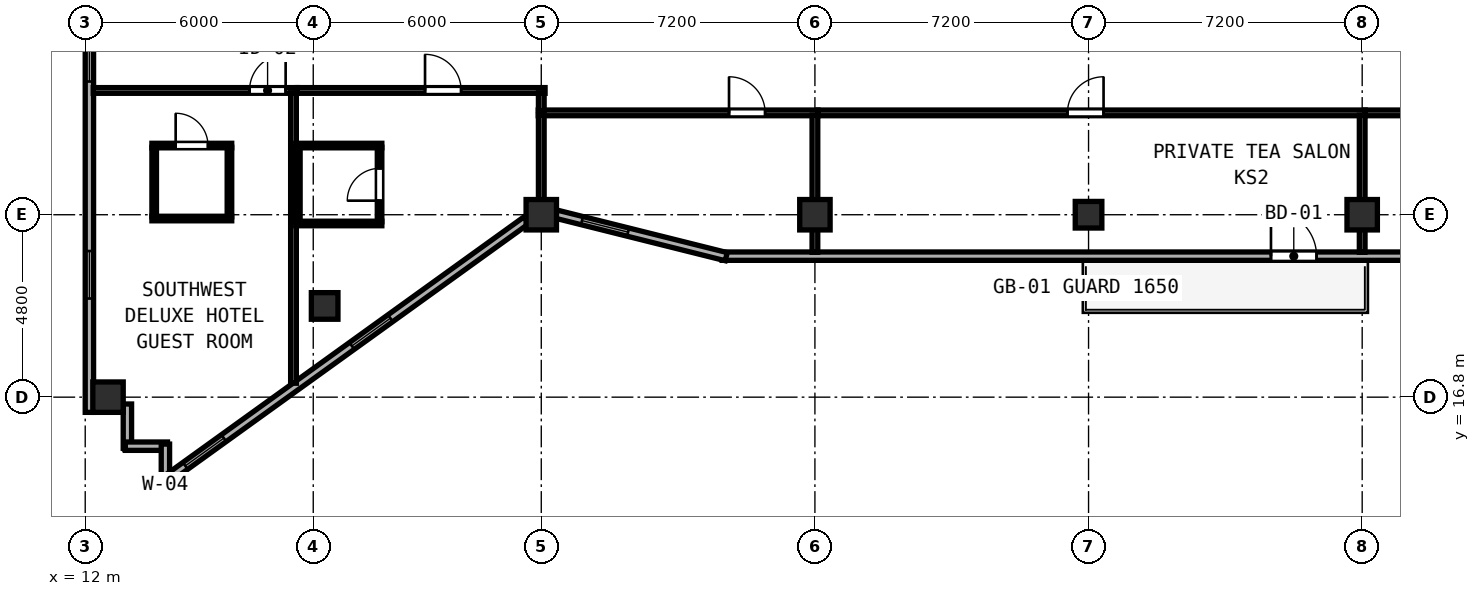
"""IFC4 building model, lengths in metres.
Left out: names, types, materials, properties, quantities, classifications, styles, units other than length and angle.
Written with IfcOpenShell. Run it as: python <this file> out.ifc"""

import sys

from ifc_helpers import new_model, si_unit, direction, frame, frame_2d, origin, origin_2d, place, context, subcontext, project, spatial, rectangle, hollow_rectangle, extrude, element, fill, save


model = new_model("IFC4")
c1 = context("Model", 3, precision=1e-05, world=origin(), true_north=direction((0.0, 1.0)))
c2 = subcontext(c1, "Body", "Model", "MODEL_VIEW")
j1 = project(units=[si_unit("LENGTHUNIT", "METRE"), si_unit("PLANEANGLEUNIT", "RADIAN")], contexts=[c1])
p1 = place(None, origin())
s1 = spatial("IfcSite", under=j1, at=p1, CompositionType="ELEMENT")
p2 = place(p1, origin())
s2 = spatial("IfcBuilding", under=s1, at=p2, CompositionType="ELEMENT")
p3 = place(p2, frame((0.0, 0.0, 246.75)))
s3 = spatial("IfcBuildingStorey", under=s2, at=p3, CompositionType="ELEMENT", Elevation=246.75)
for number, where, z_axis, x_axis in (
    (1, (24.0, 21.6, 0.0), (0.0, 0.0, 1.0), (1.0, 0.0, 0.0)),
    (2, (31.2, 21.6, 0.0), (0.0, 0.0, 1.0), (1.0, 0.0, 0.0)),
    (3, (45.6, 21.6, 0.0), (0.0, 0.0, 1.0), (1.0, 0.0, 0.0)),
    (4, (12.6, 16.8, 0.0), (0.0, 0.0, 1.0), (1.0, 0.0, 0.0)),
):
    element("IfcColumn", number, at=place(p3, frame(where, z_axis=z_axis, x_axis=x_axis)), inside=s3, PredefinedType="COLUMN", context=c2, shape_type="SweptSolid", body=[
        extrude(hollow_rectangle(XDim=0.8, YDim=0.8, WallThickness=0.03, at=origin_2d()), origin(), (0.0, 0.0, 1.0), 3.85),
    ])
for number, where, z_axis, x_axis in (
    (5, (38.4, 21.6, 0.0), (0.0, 0.0, 1.0), (1.0, 0.0, 0.0)),
    (6, (18.3, 19.2, 0.0), (0.0, 0.0, 1.0), (1.0, 0.0, 0.0)),
):
    element("IfcColumn", number, at=place(p3, frame(where, z_axis=z_axis, x_axis=x_axis)), inside=s3, PredefinedType="COLUMN", context=c2, shape_type="SweptSolid", body=[
        extrude(hollow_rectangle(XDim=0.7, YDim=0.7, WallThickness=0.026, at=origin_2d()), origin(), (0.0, 0.0, 1.0), 3.85),
    ])
p4 = place(p3, frame((28.759, 20.51, 0.0), z_axis=(0.0, 0.0, 1.0), x_axis=(1.0, 0.0, 0.0)))
e7 = element("IfcWall", 7, at=p4, inside=s3, PredefinedType="SOLIDWALL", context=c2, shape_type="SweptSolid", body=[
    extrude(rectangle(XDim=19.283, YDim=0.22, at=frame_2d((9.642, 0.0))), origin(), (0.0, 0.0, 1.0), 3.67),
])
p5 = place(p4, frame((15.641, 0.0, 0.0), z_axis=(0.0, 0.0, 1.0), x_axis=(-1.0, 0.0, 0.0)))
e8 = element("IfcOpeningElement", 8, at=p5, cuts=e7, PredefinedType="OPENING", context=c2, shape_type="SweptSolid", body=[
    extrude(rectangle(XDim=1.2, YDim=2.15, at=frame_2d((0.6, 1.075))), frame((0.0, 0.12, 0.0), z_axis=(0.0, -1.0, 0.0), x_axis=(1.0, 0.0, 0.0)), (0.0, 0.0, 1.0), 0.24),
])
p6 = place(p3, frame((12.11, 37.545, 0.0), z_axis=(0.0, 0.0, 1.0), x_axis=(0.0, -1.0, 0.0)))
e9 = element("IfcWall", 9, at=p6, inside=s3, PredefinedType="SOLIDWALL", context=c2, shape_type="SweptSolid", body=[
    extrude(rectangle(XDim=21.145, YDim=0.22, at=frame_2d((10.573, 0.0))), origin(), (0.0, 0.0, 1.0), 3.67),
])
p7 = place(p6, frame((0.7, 0.0, 0.85)))
e10 = element("IfcOpeningElement", 10, at=p7, cuts=e9, PredefinedType="OPENING", context=c2, shape_type="SweptSolid", body=[
    extrude(rectangle(XDim=1.25, YDim=1.95, at=frame_2d((0.625, 0.975))), frame((0.0, 0.12, 0.0), z_axis=(0.0, -1.0, 0.0), x_axis=(1.0, 0.0, 0.0)), (0.0, 0.0, 1.0), 0.24),
])
p8 = place(p6, frame((6.1, 0.0, 0.85)))
e11 = element("IfcOpeningElement", 11, at=p8, cuts=e9, PredefinedType="OPENING", context=c2, shape_type="SweptSolid", body=[
    extrude(rectangle(XDim=1.25, YDim=1.95, at=frame_2d((0.625, 0.975))), frame((0.0, 0.12, 0.0), z_axis=(0.0, -1.0, 0.0), x_axis=(1.0, 0.0, 0.0)), (0.0, 0.0, 1.0), 0.24),
])
p9 = place(p6, frame((11.19, 0.0, 0.85)))
e12 = element("IfcOpeningElement", 12, at=p9, cuts=e9, PredefinedType="OPENING", context=c2, shape_type="SweptSolid", body=[
    extrude(rectangle(XDim=1.25, YDim=1.95, at=frame_2d((0.625, 0.975))), frame((0.0, 0.12, 0.0), z_axis=(0.0, -1.0, 0.0), x_axis=(1.0, 0.0, 0.0)), (0.0, 0.0, 1.0), 0.24),
])
p10 = place(p6, frame((16.9, 0.0, 0.85)))
e13 = element("IfcOpeningElement", 13, at=p10, cuts=e9, PredefinedType="OPENING", context=c2, shape_type="SweptSolid", body=[
    extrude(rectangle(XDim=1.25, YDim=1.95, at=frame_2d((0.625, 0.975))), frame((0.0, 0.12, 0.0), z_axis=(0.0, -1.0, 0.0), x_axis=(1.0, 0.0, 0.0)), (0.0, 0.0, 1.0), 0.24),
])
p11 = place(p3, frame((13.11, 16.62, 0.0), z_axis=(0.0, 0.0, 1.0), x_axis=(0.0, -1.0, 0.0)))
e14 = element("IfcWall", 14, at=p11, inside=s3, PredefinedType="SOLIDWALL", context=c2, shape_type="SweptSolid", body=[
    extrude(rectangle(XDim=1.165, YDim=0.22, at=frame_2d((0.583, 0.0))), origin(), (0.0, 0.0, 1.0), 3.67),
])
p12 = place(p3, frame((13.055, 15.51, 0.0), z_axis=(0.0, 0.0, 1.0), x_axis=(1.0, 0.0, 0.0)))
e15 = element("IfcWall", 15, at=p12, inside=s3, PredefinedType="SOLIDWALL", context=c2, shape_type="SweptSolid", body=[
    extrude(rectangle(XDim=1.11, YDim=0.22, at=frame_2d((0.555, 0.0))), origin(), (0.0, 0.0, 1.0), 3.67),
])
p13 = place(p3, frame((14.11, 15.565, 0.0), z_axis=(0.0, 0.0, 1.0), x_axis=(0.0, -1.0, 0.0)))
e16 = element("IfcWall", 16, at=p13, inside=s3, PredefinedType="SOLIDWALL", context=c2, shape_type="SweptSolid", body=[
    extrude(rectangle(XDim=1.005, YDim=0.22, at=frame_2d((0.502, 0.0))), origin(), (0.0, 0.0, 1.0), 3.67),
])
p14 = place(p3, frame((14.065, 14.583, 0.0), z_axis=(0.0, 0.0, 1.0), x_axis=(0.811523708458, 0.584319493608, 0.0)))
e17 = element("IfcWall", 17, at=p14, inside=s3, PredefinedType="SOLIDWALL", context=c2, shape_type="SweptSolid", body=[
    extrude(rectangle(XDim=11.759, YDim=0.22, at=frame_2d((5.879, 0.0))), origin(), (0.0, 0.0, 1.0), 3.315),
])
p15 = place(p14, frame((0.7, 0.0, 0.85)))
e18 = element("IfcOpeningElement", 18, at=p15, cuts=e17, PredefinedType="OPENING", context=c2, shape_type="SweptSolid", body=[
    extrude(rectangle(XDim=1.25, YDim=1.95, at=frame_2d((0.625, 0.975))), frame((0.0, 0.12, 0.0), z_axis=(0.0, -1.0, 0.0), x_axis=(1.0, 0.0, 0.0)), (0.0, 0.0, 1.0), 0.24),
])
p16 = place(p14, frame((6.1, 0.0, 0.85)))
e19 = element("IfcOpeningElement", 19, at=p16, cuts=e17, PredefinedType="OPENING", context=c2, shape_type="SweptSolid", body=[
    extrude(rectangle(XDim=1.25, YDim=1.95, at=frame_2d((0.625, 0.975))), frame((0.0, 0.12, 0.0), z_axis=(0.0, -1.0, 0.0), x_axis=(1.0, 0.0, 0.0)), (0.0, 0.0, 1.0), 0.24),
])
p17 = place(p3, frame((24.392, 21.615, 0.0), z_axis=(0.0, 0.0, 1.0), x_axis=(0.970133159038, -0.242572986408, 0.0)))
e20 = element("IfcWall", 20, at=p17, inside=s3, PredefinedType="SOLIDWALL", context=c2, shape_type="SweptSolid", body=[
    extrude(rectangle(XDim=4.613, YDim=0.22, at=frame_2d((2.306, 0.0))), origin(), (0.0, 0.0, 1.0), 3.315),
])
p18 = place(p17, frame((0.7, 0.0, 0.85)))
e21 = element("IfcOpeningElement", 21, at=p18, cuts=e20, PredefinedType="OPENING", context=c2, shape_type="SweptSolid", body=[
    extrude(rectangle(XDim=1.25, YDim=1.95, at=frame_2d((0.625, 0.975))), frame((0.0, 0.12, 0.0), z_axis=(0.0, -1.0, 0.0), x_axis=(1.0, 0.0, 0.0)), (0.0, 0.0, 1.0), 0.24),
])
p19 = place(p3, frame((23.92, 24.28, 0.0), z_axis=(0.0, 0.0, 1.0), x_axis=(1.0, 0.0, 0.0)))
e22 = element("IfcWall", 22, at=p19, inside=s3, PredefinedType="PARTITIONING", context=c2, shape_type="SweptSolid", body=[
    extrude(rectangle(XDim=7.36, YDim=0.15, at=frame_2d((3.68, 0.0))), origin(), (0.0, 0.0, 1.0), 3.67),
])
p20 = place(p19, frame((5.97, 0.0, 0.0), z_axis=(0.0, 0.0, 1.0), x_axis=(-1.0, 0.0, 0.0)))
e23 = element("IfcOpeningElement", 23, at=p20, cuts=e22, PredefinedType="OPENING", context=c2, shape_type="SweptSolid", body=[
    extrude(rectangle(XDim=0.95, YDim=2.12, at=frame_2d((0.475, 1.06))), frame((0.0, 0.085, 0.0), z_axis=(0.0, -1.0, 0.0), x_axis=(1.0, 0.0, 0.0)), (0.0, 0.0, 1.0), 0.17),
])
p21 = place(p3, frame((24.0, 21.819, 0.0), z_axis=(0.0, 0.0, 1.0), x_axis=(0.0, 1.0, 0.0)))
e24 = element("IfcWall", 24, at=p21, inside=s3, PredefinedType="PARTITIONING", context=c2, shape_type="SweptSolid", body=[
    extrude(rectangle(XDim=2.401, YDim=0.15, at=frame_2d((1.201, 0.0))), origin(), (0.0, 0.0, 1.0), 3.315),
])
p22 = place(p3, frame((31.2, 20.612, 0.0), z_axis=(0.0, 0.0, 1.0), x_axis=(0.0, 1.0, 0.0)))
e25 = element("IfcWall", 25, at=p22, inside=s3, PredefinedType="PARTITIONING", context=c2, shape_type="SweptSolid", body=[
    extrude(rectangle(XDim=3.608, YDim=0.15, at=frame_2d((1.804, 0.0))), origin(), (0.0, 0.0, 1.0), 3.155),
])
p23 = place(p3, frame((31.282, 24.28, 0.0), z_axis=(0.0, 0.0, 1.0), x_axis=(1.0, 0.0, 0.0)))
e26 = element("IfcWall", 26, at=p23, inside=s3, PredefinedType="PARTITIONING", context=c2, shape_type="SweptSolid", body=[
    extrude(rectangle(XDim=14.398, YDim=0.15, at=frame_2d((7.199, 0.0))), origin(), (0.0, 0.0, 1.0), 3.67),
])
p24 = place(p23, frame((7.513, 0.0, 0.0), z_axis=(0.0, 0.0, 1.0), x_axis=(-1.0, 0.0, 0.0)))
e27 = element("IfcOpeningElement", 27, at=p24, cuts=e26, PredefinedType="OPENING", context=c2, shape_type="SweptSolid", body=[
    extrude(rectangle(XDim=0.95, YDim=2.12, at=frame_2d((0.475, 1.06))), frame((0.0, 0.085, 0.0), z_axis=(0.0, -1.0, 0.0), x_axis=(1.0, 0.0, 0.0)), (0.0, 0.0, 1.0), 0.17),
])
p25 = place(p3, frame((45.6, 20.612, 0.0), z_axis=(0.0, 0.0, 1.0), x_axis=(0.0, 1.0, 0.0)))
e28 = element("IfcWall", 28, at=p25, inside=s3, PredefinedType="PARTITIONING", context=c2, shape_type="SweptSolid", body=[
    extrude(rectangle(XDim=3.608, YDim=0.15, at=frame_2d((1.804, 0.0))), origin(), (0.0, 0.0, 1.0), 3.155),
])
p26 = place(p3, frame((45.682, 24.28, 0.0), z_axis=(0.0, 0.0, 1.0), x_axis=(1.0, 0.0, 0.0)))
e29 = element("IfcWall", 29, at=p26, inside=s3, PredefinedType="PARTITIONING", context=c2, shape_type="SweptSolid", body=[
    extrude(rectangle(XDim=6.906, YDim=0.15, at=frame_2d((3.453, 0.0))), origin(), (0.0, 0.0, 1.0), 3.67),
])
p27 = place(p26, frame((2.018, 0.0, 0.0), z_axis=(0.0, 0.0, 1.0), x_axis=(-1.0, 0.0, 0.0)))
e30 = element("IfcOpeningElement", 30, at=p27, cuts=e29, PredefinedType="OPENING", context=c2, shape_type="SweptSolid", body=[
    extrude(rectangle(XDim=0.95, YDim=2.12, at=frame_2d((0.475, 1.06))), frame((0.0, 0.085, 0.0), z_axis=(0.0, -1.0, 0.0), x_axis=(1.0, 0.0, 0.0)), (0.0, 0.0, 1.0), 0.17),
])
p28 = place(p3, frame((12.212, 24.87, 0.0), z_axis=(0.0, 0.0, 1.0), x_axis=(1.0, 0.0, 0.0)))
e31 = element("IfcWall", 31, at=p28, inside=s3, PredefinedType="PARTITIONING", context=c2, shape_type="SweptSolid", body=[
    extrude(rectangle(XDim=5.368, YDim=0.15, at=frame_2d((2.684, 0.0))), origin(), (0.0, 0.0, 1.0), 3.355),
])
p29 = place(p28, frame((5.062, 0.0, 0.0), z_axis=(0.0, 0.0, 1.0), x_axis=(-1.0, 0.0, 0.0)))
e32 = element("IfcOpeningElement", 32, at=p29, cuts=e31, PredefinedType="OPENING", context=c2, shape_type="SweptSolid", body=[
    extrude(rectangle(XDim=0.95, YDim=2.15, at=frame_2d((0.475, 1.075))), frame((0.0, 0.085, 0.0), z_axis=(0.0, -1.0, 0.0), x_axis=(1.0, 0.0, 0.0)), (0.0, 0.0, 1.0), 0.17),
])
p30 = place(p3, frame((17.48, 17.167, 0.0), z_axis=(0.0, 0.0, 1.0), x_axis=(0.0, 1.0, 0.0)))
e33 = element("IfcWall", 33, at=p30, inside=s3, PredefinedType="PARTITIONING", context=c2, shape_type="SweptSolid", body=[
    extrude(rectangle(XDim=7.643, YDim=0.15, at=frame_2d((3.822, 0.0))), origin(), (0.0, 0.0, 1.0), 3.67),
])
p31 = place(p3, frame((13.755, 23.42, 0.0), z_axis=(0.0, 0.0, 1.0), x_axis=(1.0, 0.0, 0.0)))
e34 = element("IfcWall", 34, at=p31, inside=s3, PredefinedType="PARTITIONING", context=c2, shape_type="SweptSolid", body=[
    extrude(rectangle(XDim=2.1, YDim=0.12, at=frame_2d((1.05, 0.0))), origin(), (0.0, 0.0, 1.0), 3.67),
])
p32 = place(p31, frame((1.475, 0.0, 0.0), z_axis=(0.0, 0.0, 1.0), x_axis=(-1.0, 0.0, 0.0)))
e35 = element("IfcOpeningElement", 35, at=p32, cuts=e34, PredefinedType="OPENING", context=c2, shape_type="SweptSolid", body=[
    extrude(rectangle(XDim=0.85, YDim=2.1, at=frame_2d((0.425, 1.05))), frame((0.0, 0.07, 0.0), z_axis=(0.0, -1.0, 0.0), x_axis=(1.0, 0.0, 0.0)), (0.0, 0.0, 1.0), 0.14),
])
p33 = place(p3, frame((13.755, 21.5, 0.0), z_axis=(0.0, 0.0, 1.0), x_axis=(1.0, 0.0, 0.0)))
e36 = element("IfcWall", 36, at=p33, inside=s3, PredefinedType="PARTITIONING", context=c2, shape_type="SweptSolid", body=[
    extrude(rectangle(XDim=2.1, YDim=0.12, at=frame_2d((1.05, 0.0))), origin(), (0.0, 0.0, 1.0), 3.67),
])
for number, where, z_axis, x_axis in (
    (37, (13.815, 21.545, 0.0), (0.0, 0.0, 1.0), (0.0, 1.0, 0.0)),
    (38, (15.795, 21.545, 0.0), (0.0, 0.0, 1.0), (0.0, 1.0, 0.0)),
):
    element("IfcWall", number, at=place(p3, frame(where, z_axis=z_axis, x_axis=x_axis)), inside=s3, PredefinedType="PARTITIONING", context=c2, shape_type="SweptSolid", body=[
        extrude(rectangle(XDim=1.83, YDim=0.12, at=frame_2d((0.915, 0.0))), origin(), (0.0, 0.0, 1.0), 3.67),
    ])
p34 = place(p3, frame((17.582, 24.87, 0.0), z_axis=(0.0, 0.0, 1.0), x_axis=(1.0, 0.0, 0.0)))
e39 = element("IfcWall", 39, at=p34, inside=s3, PredefinedType="PARTITIONING", context=c2, shape_type="SweptSolid", body=[
    extrude(rectangle(XDim=6.518, YDim=0.15, at=frame_2d((3.259, 0.0))), origin(), (0.0, 0.0, 1.0), 3.355),
])
p35 = place(p34, frame((4.309, 0.0, 0.0), z_axis=(0.0, 0.0, 1.0), x_axis=(-1.0, 0.0, 0.0)))
e40 = element("IfcOpeningElement", 40, at=p35, cuts=e39, PredefinedType="OPENING", context=c2, shape_type="SweptSolid", body=[
    extrude(rectangle(XDim=0.95, YDim=2.18, at=frame_2d((0.475, 1.09))), frame((0.0, 0.085, 0.0), z_axis=(0.0, -1.0, 0.0), x_axis=(1.0, 0.0, 0.0)), (0.0, 0.0, 1.0), 0.17),
])
p36 = place(p3, frame((24.0, 24.34, 0.0), z_axis=(0.0, 0.0, 1.0), x_axis=(0.0, 1.0, 0.0)))
e41 = element("IfcWall", 41, at=p36, inside=s3, PredefinedType="PARTITIONING", context=c2, shape_type="SweptSolid", body=[
    extrude(rectangle(XDim=0.47, YDim=0.15, at=frame_2d((0.235, 0.0))), origin(), (0.0, 0.0, 1.0), 3.315),
])
for number, where, z_axis, x_axis in (
    (42, (17.54, 23.42, 0.0), (0.0, 0.0, 1.0), (1.0, 0.0, 0.0)),
    (43, (17.54, 21.37, 0.0), (0.0, 0.0, 1.0), (1.0, 0.0, 0.0)),
):
    element("IfcWall", number, at=place(p3, frame(where, z_axis=z_axis, x_axis=x_axis)), inside=s3, PredefinedType="PARTITIONING", context=c2, shape_type="SweptSolid", body=[
        extrude(rectangle(XDim=2.265, YDim=0.12, at=frame_2d((1.132, 0.0))), origin(), (0.0, 0.0, 1.0), 3.67),
    ])
p37 = place(p3, frame((17.595, 21.415, 0.0), z_axis=(0.0, 0.0, 1.0), x_axis=(0.0, 1.0, 0.0)))
e44 = element("IfcWall", 44, at=p37, inside=s3, PredefinedType="PARTITIONING", context=c2, shape_type="SweptSolid", body=[
    extrude(rectangle(XDim=1.96, YDim=0.12, at=frame_2d((0.98, 0.0))), origin(), (0.0, 0.0, 1.0), 3.67),
])
p38 = place(p3, frame((19.745, 21.415, 0.0), z_axis=(0.0, 0.0, 1.0), x_axis=(0.0, 1.0, 0.0)))
e45 = element("IfcWall", 45, at=p38, inside=s3, PredefinedType="PARTITIONING", context=c2, shape_type="SweptSolid", body=[
    extrude(rectangle(XDim=1.96, YDim=0.12, at=frame_2d((0.98, 0.0))), origin(), (0.0, 0.0, 1.0), 3.67),
])
p39 = place(p38, frame((0.555, 0.0, 0.0)))
e46 = element("IfcOpeningElement", 46, at=p39, cuts=e45, PredefinedType="OPENING", context=c2, shape_type="SweptSolid", body=[
    extrude(rectangle(XDim=0.85, YDim=2.1, at=frame_2d((0.425, 1.05))), frame((0.0, 0.07, 0.0), z_axis=(0.0, -1.0, 0.0), x_axis=(1.0, 0.0, 0.0)), (0.0, 0.0, 1.0), 0.14),
])
p40 = place(p9, origin())
e47 = element("IfcWindow", 47, at=p40, inside=s3, PartitioningType="SINGLE_PANEL", PredefinedType="WINDOW", context=c2, shape_type="SweptSolid", body=[
    extrude(rectangle(XDim=1.25, YDim=1.95, at=frame_2d((0.625, 0.975))), frame((0.0, 0.03, 0.0), z_axis=(0.0, -1.0, 0.0), x_axis=(1.0, 0.0, 0.0)), (0.0, 0.0, 1.0), 0.06),
])
fill(e12, e47)
p41 = place(p10, origin())
e48 = element("IfcWindow", 48, at=p41, inside=s3, PartitioningType="SINGLE_PANEL", PredefinedType="WINDOW", context=c2, shape_type="SweptSolid", body=[
    extrude(rectangle(XDim=1.25, YDim=1.95, at=frame_2d((0.625, 0.975))), frame((0.0, 0.03, 0.0), z_axis=(0.0, -1.0, 0.0), x_axis=(1.0, 0.0, 0.0)), (0.0, 0.0, 1.0), 0.06),
])
fill(e13, e48)
p42 = place(p15, origin())
e49 = element("IfcWindow", 49, at=p42, inside=s3, PartitioningType="SINGLE_PANEL", PredefinedType="WINDOW", context=c2, shape_type="SweptSolid", body=[
    extrude(rectangle(XDim=1.25, YDim=1.95, at=frame_2d((0.625, 0.975))), frame((0.0, 0.03, 0.0), z_axis=(0.0, -1.0, 0.0), x_axis=(1.0, 0.0, 0.0)), (0.0, 0.0, 1.0), 0.06),
])
fill(e18, e49)
p43 = place(p16, origin())
e50 = element("IfcWindow", 50, at=p43, inside=s3, PartitioningType="SINGLE_PANEL", PredefinedType="WINDOW", context=c2, shape_type="SweptSolid", body=[
    extrude(rectangle(XDim=1.25, YDim=1.95, at=frame_2d((0.625, 0.975))), frame((0.0, 0.03, 0.0), z_axis=(0.0, -1.0, 0.0), x_axis=(1.0, 0.0, 0.0)), (0.0, 0.0, 1.0), 0.06),
])
fill(e19, e50)
p44 = place(p18, origin())
e51 = element("IfcWindow", 51, at=p44, inside=s3, PartitioningType="SINGLE_PANEL", PredefinedType="WINDOW", context=c2, shape_type="SweptSolid", body=[
    extrude(rectangle(XDim=1.25, YDim=1.95, at=frame_2d((0.625, 0.975))), frame((0.0, 0.03, 0.0), z_axis=(0.0, -1.0, 0.0), x_axis=(1.0, 0.0, 0.0)), (0.0, 0.0, 1.0), 0.06),
])
fill(e21, e51)
p45 = place(p5, origin())
e52 = element("IfcDoor", 52, at=p45, inside=s3, OperationType="SINGLE_SWING_RIGHT", PredefinedType="DOOR", context=c2, shape_type="SweptSolid", body=[
    extrude(rectangle(XDim=1.2, YDim=2.15, at=frame_2d((0.6, 1.075))), frame((0.0, 0.025, 0.0), z_axis=(0.0, -1.0, 0.0), x_axis=(1.0, 0.0, 0.0)), (0.0, 0.0, 1.0), 0.05),
])
fill(e8, e52)
p46 = place(p20, origin())
e53 = element("IfcDoor", 53, at=p46, inside=s3, OperationType="SINGLE_SWING_RIGHT", PredefinedType="DOOR", context=c2, shape_type="SweptSolid", body=[
    extrude(rectangle(XDim=0.95, YDim=2.12, at=frame_2d((0.475, 1.06))), frame((0.0, 0.025, 0.0), z_axis=(0.0, -1.0, 0.0), x_axis=(1.0, 0.0, 0.0)), (0.0, 0.0, 1.0), 0.05),
])
fill(e23, e53)
p47 = place(p24, origin())
e54 = element("IfcDoor", 54, at=p47, inside=s3, OperationType="SINGLE_SWING_LEFT", PredefinedType="DOOR", context=c2, shape_type="SweptSolid", body=[
    extrude(rectangle(XDim=0.95, YDim=2.12, at=frame_2d((0.475, 1.06))), frame((0.0, 0.025, 0.0), z_axis=(0.0, -1.0, 0.0), x_axis=(1.0, 0.0, 0.0)), (0.0, 0.0, 1.0), 0.05),
])
fill(e27, e54)
p48 = place(p29, origin())
e55 = element("IfcDoor", 55, at=p48, inside=s3, OperationType="SINGLE_SWING_LEFT", PredefinedType="DOOR", context=c2, shape_type="SweptSolid", body=[
    extrude(rectangle(XDim=0.95, YDim=2.15, at=frame_2d((0.475, 1.075))), frame((0.0, 0.025, 0.0), z_axis=(0.0, -1.0, 0.0), x_axis=(1.0, 0.0, 0.0)), (0.0, 0.0, 1.0), 0.05),
])
fill(e32, e55)
p49 = place(p32, origin())
e56 = element("IfcDoor", 56, at=p49, inside=s3, OperationType="SINGLE_SWING_RIGHT", PredefinedType="DOOR", context=c2, shape_type="SweptSolid", body=[
    extrude(rectangle(XDim=0.85, YDim=2.1, at=frame_2d((0.425, 1.05))), frame((0.0, 0.025, 0.0), z_axis=(0.0, -1.0, 0.0), x_axis=(1.0, 0.0, 0.0)), (0.0, 0.0, 1.0), 0.05),
])
fill(e35, e56)
p50 = place(p35, origin())
e57 = element("IfcDoor", 57, at=p50, inside=s3, OperationType="SINGLE_SWING_RIGHT", PredefinedType="DOOR", context=c2, shape_type="SweptSolid", body=[
    extrude(rectangle(XDim=0.95, YDim=2.18, at=frame_2d((0.475, 1.09))), frame((0.0, 0.025, 0.0), z_axis=(0.0, -1.0, 0.0), x_axis=(1.0, 0.0, 0.0)), (0.0, 0.0, 1.0), 0.05),
])
fill(e40, e57)
p51 = place(p39, origin())
e58 = element("IfcDoor", 58, at=p51, inside=s3, OperationType="SINGLE_SWING_LEFT", PredefinedType="DOOR", context=c2, shape_type="SweptSolid", body=[
    extrude(rectangle(XDim=0.85, YDim=2.1, at=frame_2d((0.425, 1.05))), frame((0.0, 0.025, 0.0), z_axis=(0.0, -1.0, 0.0), x_axis=(1.0, 0.0, 0.0)), (0.0, 0.0, 1.0), 0.05),
])
fill(e46, e58)
save(model, sys.argv[1])
